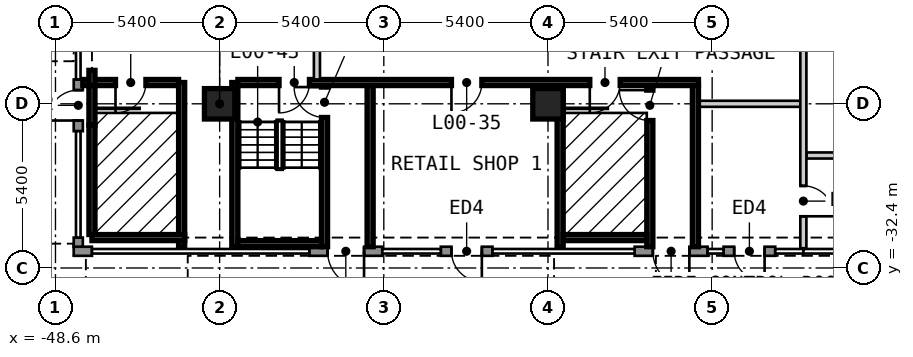
"""IFC4 building model, lengths in metres.
Left out: names, types, materials, properties, quantities, classifications, styles, units other than length and angle.
Written with IfcOpenShell. Run it as: python <this file> out.ifc"""

import sys

from ifc_helpers import new_model, si_unit, direction, frame, frame_2d, origin, origin_2d, place, context, subcontext, project, spatial, rectangle, extrude, element, fill, save


model = new_model("IFC4")
c1 = context("Model", 3, precision=1e-05, world=origin(), true_north=direction((0.0, 1.0)))
c2 = subcontext(c1, "Body", "Model", "MODEL_VIEW")
j1 = project(units=[si_unit("LENGTHUNIT", "METRE"), si_unit("PLANEANGLEUNIT", "RADIAN")], contexts=[c1])
p1 = place(None, origin())
s1 = spatial("IfcSite", under=j1, at=p1, CompositionType="ELEMENT")
p2 = place(p1, origin())
s2 = spatial("IfcBuilding", under=s1, at=p2, CompositionType="ELEMENT")
p3 = place(p2, origin())
s3 = spatial("IfcBuildingStorey", under=s2, at=p3, CompositionType="ELEMENT", Elevation=0.0)
for number, where, z_axis, x_axis in (
    (1, (-43.2, -27.0, 0.0), (0.0, 0.0, 1.0), (1.0, 0.0, 0.0)),
    (2, (-32.4, -27.0, 0.0), (0.0, 0.0, 1.0), (1.0, 0.0, 0.0)),
):
    element("IfcColumn", number, at=place(p3, frame(where, z_axis=z_axis, x_axis=x_axis)), inside=s3, PredefinedType="COLUMN", context=c2, shape_type="SweptSolid", body=[
        extrude(rectangle(XDim=1.0, YDim=1.0, at=origin_2d()), origin(), (0.0, 0.0, 1.0), 5.0),
    ])
p4 = place(p3, frame((-48.0, -31.85, 0.0), z_axis=(0.0, 0.0, 1.0), x_axis=(1.0, 0.0, 0.0)))
e3 = element("IfcWall", 3, at=p4, inside=s3, PredefinedType="SOLIDWALL", context=c2, shape_type="SweptSolid", body=[
    extrude(rectangle(XDim=0.6, YDim=0.3, at=frame_2d((0.3, 0.0))), origin(), (0.0, 0.0, 1.0), 4.55),
])
p5 = place(p3, frame((-40.25, -31.85, 0.0), z_axis=(0.0, 0.0, 1.0), x_axis=(1.0, 0.0, 0.0)))
e4 = element("IfcWall", 4, at=p5, inside=s3, PredefinedType="SOLIDWALL", context=c2, shape_type="SweptSolid", body=[
    extrude(rectangle(XDim=2.4, YDim=0.3, at=frame_2d((1.2, 0.0))), origin(), (0.0, 0.0, 1.0), 4.55),
])
p6 = place(p5, frame((1.8, 0.0, 0.0), z_axis=(0.0, 0.0, 1.0), x_axis=(-1.0, 0.0, 0.0)))
e5 = element("IfcOpeningElement", 5, at=p6, cuts=e4, PredefinedType="OPENING", context=c2, shape_type="SweptSolid", body=[
    extrude(rectangle(XDim=1.2, YDim=2.4, at=frame_2d((0.6, 1.2))), frame((0.0, 0.16, 0.0), z_axis=(0.0, -1.0, 0.0), x_axis=(1.0, 0.0, 0.0)), (0.0, 0.0, 1.0), 0.32),
])
p7 = place(p3, frame((-35.925, -31.85, 0.0), z_axis=(0.0, 0.0, 1.0), x_axis=(1.0, 0.0, 0.0)))
e6 = element("IfcWall", 6, at=p7, inside=s3, PredefinedType="SOLIDWALL", context=c2, shape_type="SweptSolid", body=[
    extrude(rectangle(XDim=1.7, YDim=0.3, at=frame_2d((0.85, 0.0))), origin(), (0.0, 0.0, 1.0), 4.55),
])
p8 = place(p7, frame((1.35, 0.0, 0.0), z_axis=(0.0, 0.0, 1.0), x_axis=(-1.0, 0.0, 0.0)))
e7 = element("IfcOpeningElement", 7, at=p8, cuts=e6, PredefinedType="OPENING", context=c2, shape_type="SweptSolid", body=[
    extrude(rectangle(XDim=1.0, YDim=2.4, at=frame_2d((0.5, 1.2))), frame((0.0, 0.16, 0.0), z_axis=(0.0, -1.0, 0.0), x_axis=(1.0, 0.0, 0.0)), (0.0, 0.0, 1.0), 0.32),
])
p9 = place(p3, frame((-29.55, -31.85, 0.0), z_axis=(0.0, 0.0, 1.0), x_axis=(1.0, 0.0, 0.0)))
e8 = element("IfcWall", 8, at=p9, inside=s3, PredefinedType="SOLIDWALL", context=c2, shape_type="SweptSolid", body=[
    extrude(rectangle(XDim=2.4, YDim=0.3, at=frame_2d((1.2, 0.0))), origin(), (0.0, 0.0, 1.0), 4.55),
])
p10 = place(p9, frame((1.8, 0.0, 0.0), z_axis=(0.0, 0.0, 1.0), x_axis=(-1.0, 0.0, 0.0)))
e9 = element("IfcOpeningElement", 9, at=p10, cuts=e8, PredefinedType="OPENING", context=c2, shape_type="SweptSolid", body=[
    extrude(rectangle(XDim=1.2, YDim=2.4, at=frame_2d((0.6, 1.2))), frame((0.0, 0.16, 0.0), z_axis=(0.0, -1.0, 0.0), x_axis=(1.0, 0.0, 0.0)), (0.0, 0.0, 1.0), 0.32),
])
p11 = place(p3, frame((-26.625, -31.85, 0.0), z_axis=(0.0, 0.0, 1.0), x_axis=(1.0, 0.0, 0.0)))
e10 = element("IfcWall", 10, at=p11, inside=s3, PredefinedType="SOLIDWALL", context=c2, shape_type="SweptSolid", body=[
    extrude(rectangle(XDim=1.7, YDim=0.3, at=frame_2d((0.85, 0.0))), origin(), (0.0, 0.0, 1.0), 4.55),
])
p12 = place(p11, frame((1.35, 0.0, 0.0), z_axis=(0.0, 0.0, 1.0), x_axis=(-1.0, 0.0, 0.0)))
e11 = element("IfcOpeningElement", 11, at=p12, cuts=e10, PredefinedType="OPENING", context=c2, shape_type="SweptSolid", body=[
    extrude(rectangle(XDim=1.0, YDim=2.4, at=frame_2d((0.5, 1.2))), frame((0.0, 0.16, 0.0), z_axis=(0.0, -1.0, 0.0), x_axis=(1.0, 0.0, 0.0)), (0.0, 0.0, 1.0), 0.32),
])
p13 = place(p3, frame((-47.85, -26.2, 0.0), z_axis=(0.0, 0.0, 1.0), x_axis=(0.0, -1.0, 0.0)))
e12 = element("IfcWall", 12, at=p13, inside=s3, PredefinedType="SOLIDWALL", context=c2, shape_type="SweptSolid", body=[
    extrude(rectangle(XDim=1.7, YDim=0.3, at=frame_2d((0.85, 0.0))), origin(), (0.0, 0.0, 1.0), 4.55),
])
p14 = place(p13, frame((1.35, 0.0, 0.0), z_axis=(0.0, 0.0, 1.0), x_axis=(-1.0, 0.0, 0.0)))
e13 = element("IfcOpeningElement", 13, at=p14, cuts=e12, PredefinedType="OPENING", context=c2, shape_type="SweptSolid", body=[
    extrude(rectangle(XDim=1.0, YDim=2.4, at=frame_2d((0.5, 1.2))), frame((0.0, 0.16, 0.0), z_axis=(0.0, -1.0, 0.0), x_axis=(1.0, 0.0, 0.0)), (0.0, 0.0, 1.0), 0.32),
])
p15 = place(p3, frame((-47.85, -31.4, 0.0), z_axis=(0.0, 0.0, 1.0), x_axis=(0.0, -1.0, 0.0)))
e14 = element("IfcWall", 14, at=p15, inside=s3, PredefinedType="SOLIDWALL", context=c2, shape_type="SweptSolid", body=[
    extrude(rectangle(XDim=0.3, YDim=0.3, at=frame_2d((0.15, 0.0))), origin(), (0.0, 0.0, 1.0), 4.55),
])
p16 = place(p3, frame((-23.9, -28.7, 0.0), z_axis=(0.0, 0.0, 1.0), x_axis=(1.0, 0.0, 0.0)))
e15 = element("IfcWall", 15, at=p16, inside=s3, PredefinedType="PARTITIONING", context=c2, shape_type="SweptSolid", body=[
    extrude(rectangle(XDim=9.4, YDim=0.2, at=frame_2d((4.7, 0.0))), origin(), (0.0, 0.0, 1.0), 4.55),
])
p17 = place(p16, frame((3.2, 0.0, 0.0)))
e16 = element("IfcOpeningElement", 16, at=p17, cuts=e15, PredefinedType="OPENING", context=c2, shape_type="SweptSolid", body=[
    extrude(rectangle(XDim=3.0, YDim=2.1, at=frame_2d((1.5, 1.05))), frame((0.0, 0.11, 0.0), z_axis=(0.0, -1.0, 0.0), x_axis=(1.0, 0.0, 0.0)), (0.0, 0.0, 1.0), 0.22),
])
p18 = place(p3, frame((-27.45, -27.0, 0.0), z_axis=(0.0, 0.0, 1.0), x_axis=(1.0, 0.0, 0.0)))
e17 = element("IfcWall", 17, at=p18, inside=s3, PredefinedType="SOLIDWALL", context=c2, shape_type="SweptSolid", body=[
    extrude(rectangle(XDim=3.35, YDim=0.2, at=frame_2d((1.675, 0.0))), origin(), (0.0, 0.0, 1.0), 4.55),
])
p19 = place(p3, frame((-47.7, -26.3, 0.0), z_axis=(0.0, 0.0, 1.0), x_axis=(1.0, 0.0, 0.0)))
e18 = element("IfcWall", 18, at=p19, inside=s3, PredefinedType="SOLIDWALL", context=c2, shape_type="SweptSolid", body=[
    extrude(rectangle(XDim=3.15, YDim=0.2, at=frame_2d((1.575, 0.0))), origin(), (0.0, 0.0, 1.0), 4.55),
])
p20 = place(p19, frame((2.075, 0.0, 0.0), z_axis=(0.0, 0.0, 1.0), x_axis=(-1.0, 0.0, 0.0)))
e19 = element("IfcOpeningElement", 19, at=p20, cuts=e18, PredefinedType="OPENING", context=c2, shape_type="SweptSolid", body=[
    extrude(rectangle(XDim=1.0, YDim=2.1, at=frame_2d((0.5, 1.05))), frame((0.0, 0.11, 0.0), z_axis=(0.0, -1.0, 0.0), x_axis=(1.0, 0.0, 0.0)), (0.0, 0.0, 1.0), 0.22),
])
p21 = place(p3, frame((-42.6, -26.3, 0.0), z_axis=(0.0, 0.0, 1.0), x_axis=(1.0, 0.0, 0.0)))
e20 = element("IfcWall", 20, at=p21, inside=s3, PredefinedType="SOLIDWALL", context=c2, shape_type="SweptSolid", body=[
    extrude(rectangle(XDim=15.15, YDim=0.2, at=frame_2d((7.575, 0.0))), origin(), (0.0, 0.0, 1.0), 4.55),
])
p22 = place(p21, frame((8.025, 0.0, 0.0), z_axis=(0.0, 0.0, 1.0), x_axis=(-1.0, 0.0, 0.0)))
e21 = element("IfcOpeningElement", 21, at=p22, cuts=e20, PredefinedType="OPENING", context=c2, shape_type="SweptSolid", body=[
    extrude(rectangle(XDim=1.0, YDim=2.1, at=frame_2d((0.5, 1.05))), frame((0.0, 0.11, 0.0), z_axis=(0.0, -1.0, 0.0), x_axis=(1.0, 0.0, 0.0)), (0.0, 0.0, 1.0), 0.22),
])
p23 = place(p21, frame((2.354, 0.0, 0.0), z_axis=(0.0, 0.0, 1.0), x_axis=(-1.0, 0.0, 0.0)))
e22 = element("IfcOpeningElement", 22, at=p23, cuts=e20, PredefinedType="OPENING", context=c2, shape_type="SweptSolid", body=[
    extrude(rectangle(XDim=1.0, YDim=2.1, at=frame_2d((0.5, 1.05))), frame((0.0, 0.11, 0.0), z_axis=(0.0, -1.0, 0.0), x_axis=(1.0, 0.0, 0.0)), (0.0, 0.0, 1.0), 0.22),
])
p24 = place(p21, frame((12.575, 0.0, 0.0), z_axis=(0.0, 0.0, 1.0), x_axis=(-1.0, 0.0, 0.0)))
e23 = element("IfcOpeningElement", 23, at=p24, cuts=e20, PredefinedType="OPENING", context=c2, shape_type="SweptSolid", body=[
    extrude(rectangle(XDim=1.0, YDim=2.1, at=frame_2d((0.5, 1.05))), frame((0.0, 0.11, 0.0), z_axis=(0.0, -1.0, 0.0), x_axis=(1.0, 0.0, 0.0)), (0.0, 0.0, 1.0), 0.22),
])
for number, where, z_axis, x_axis in (
    (24, (-44.45, -31.7, 0.0), (0.0, 0.0, 1.0), (0.0, 1.0, 0.0)),
    (25, (-42.7, -31.7, 0.0), (0.0, 0.0, 1.0), (0.0, 1.0, 0.0)),
):
    element("IfcWall", number, at=place(p3, frame(where, z_axis=z_axis, x_axis=x_axis)), inside=s3, PredefinedType="SOLIDWALL", context=c2, shape_type="SweptSolid", body=[
        extrude(rectangle(XDim=5.4, YDim=0.2, at=frame_2d((2.7, 0.0))), origin(), (0.0, 0.0, 1.0), 4.55),
    ])
p25 = place(p3, frame((-40.0, -26.2, 0.0), z_axis=(0.0, 0.0, 1.0), x_axis=(0.0, 1.0, 0.0)))
e26 = element("IfcWall", 26, at=p25, inside=s3, PredefinedType="PARTITIONING", context=c2, shape_type="SweptSolid", body=[
    extrude(rectangle(XDim=17.08, YDim=0.2, at=frame_2d((8.54, 0.0))), origin(), (0.0, 0.0, 1.0), 4.55),
])
p26 = place(p25, frame((3.552, 0.0, 0.0)))
e27 = element("IfcOpeningElement", 27, at=p26, cuts=e26, PredefinedType="OPENING", context=c2, shape_type="SweptSolid", body=[
    extrude(rectangle(XDim=1.0, YDim=2.1, at=frame_2d((0.5, 1.05))), frame((0.0, 0.11, 0.0), z_axis=(0.0, -1.0, 0.0), x_axis=(1.0, 0.0, 0.0)), (0.0, 0.0, 1.0), 0.22),
])
p27 = place(p25, frame((12.198, 0.0, 0.0)))
e28 = element("IfcOpeningElement", 28, at=p27, cuts=e26, PredefinedType="OPENING", context=c2, shape_type="SweptSolid", body=[
    extrude(rectangle(XDim=1.0, YDim=2.1, at=frame_2d((0.5, 1.05))), frame((0.0, 0.11, 0.0), z_axis=(0.0, -1.0, 0.0), x_axis=(1.0, 0.0, 0.0)), (0.0, 0.0, 1.0), 0.22),
])
p28 = place(p3, frame((-39.75, -31.7, 0.0), z_axis=(0.0, 0.0, 1.0), x_axis=(0.0, 1.0, 0.0)))
e29 = element("IfcWall", 29, at=p28, inside=s3, PredefinedType="SOLIDWALL", context=c2, shape_type="SweptSolid", body=[
    extrude(rectangle(XDim=5.3, YDim=0.2, at=frame_2d((2.65, 0.0))), origin(), (0.0, 0.0, 1.0), 4.55),
])
p29 = place(p28, frame((5.25, 0.0, 0.0), z_axis=(0.0, 0.0, 1.0), x_axis=(-1.0, 0.0, 0.0)))
e30 = element("IfcOpeningElement", 30, at=p29, cuts=e29, PredefinedType="OPENING", context=c2, shape_type="SweptSolid", body=[
    extrude(rectangle(XDim=1.0, YDim=2.1, at=frame_2d((0.5, 1.05))), frame((0.0, 0.11, 0.0), z_axis=(0.0, -1.0, 0.0), x_axis=(1.0, 0.0, 0.0)), (0.0, 0.0, 1.0), 0.22),
])
for number, where, z_axis, x_axis in (
    (31, (-38.25, -31.7, 0.0), (0.0, 0.0, 1.0), (0.0, 1.0, 0.0)),
    (32, (-32.0, -31.7, 0.0), (0.0, 0.0, 1.0), (0.0, 1.0, 0.0)),
):
    element("IfcWall", number, at=place(p3, frame(where, z_axis=z_axis, x_axis=x_axis)), inside=s3, PredefinedType="SOLIDWALL", context=c2, shape_type="SweptSolid", body=[
        extrude(rectangle(XDim=5.3, YDim=0.2, at=frame_2d((2.65, 0.0))), origin(), (0.0, 0.0, 1.0), 4.55),
    ])
p30 = place(p3, frame((-29.05, -31.7, 0.0), z_axis=(0.0, 0.0, 1.0), x_axis=(0.0, 1.0, 0.0)))
e33 = element("IfcWall", 33, at=p30, inside=s3, PredefinedType="SOLIDWALL", context=c2, shape_type="SweptSolid", body=[
    extrude(rectangle(XDim=5.3, YDim=0.2, at=frame_2d((2.65, 0.0))), origin(), (0.0, 0.0, 1.0), 4.55),
])
p31 = place(p30, frame((5.15, 0.0, 0.0), z_axis=(0.0, 0.0, 1.0), x_axis=(-1.0, 0.0, 0.0)))
e34 = element("IfcOpeningElement", 34, at=p31, cuts=e33, PredefinedType="OPENING", context=c2, shape_type="SweptSolid", body=[
    extrude(rectangle(XDim=1.0, YDim=2.1, at=frame_2d((0.5, 1.05))), frame((0.0, 0.11, 0.0), z_axis=(0.0, -1.0, 0.0), x_axis=(1.0, 0.0, 0.0)), (0.0, 0.0, 1.0), 0.22),
])
p32 = place(p3, frame((-27.55, -31.7, 0.0), z_axis=(0.0, 0.0, 1.0), x_axis=(0.0, 1.0, 0.0)))
e35 = element("IfcWall", 35, at=p32, inside=s3, PredefinedType="SOLIDWALL", context=c2, shape_type="SweptSolid", body=[
    extrude(rectangle(XDim=5.3, YDim=0.2, at=frame_2d((2.65, 0.0))), origin(), (0.0, 0.0, 1.0), 4.55),
])
p33 = place(p3, frame((-24.0, -31.75, 0.0), z_axis=(0.0, 0.0, 1.0), x_axis=(0.0, 1.0, 0.0)))
e36 = element("IfcWall", 36, at=p33, inside=s3, PredefinedType="SOLIDWALL", context=c2, shape_type="SweptSolid", body=[
    extrude(rectangle(XDim=18.346, YDim=0.2, at=frame_2d((9.173, 0.0))), origin(), (0.0, 0.0, 1.0), 4.55),
])
p34 = place(p33, frame((2.05, 0.0, 0.0), z_axis=(0.0, 0.0, 1.0), x_axis=(-1.0, 0.0, 0.0)))
e37 = element("IfcOpeningElement", 37, at=p34, cuts=e36, PredefinedType="OPENING", context=c2, shape_type="SweptSolid", body=[
    extrude(rectangle(XDim=1.0, YDim=2.1, at=frame_2d((0.5, 1.05))), frame((0.0, 0.11, 0.0), z_axis=(0.0, -1.0, 0.0), x_axis=(1.0, 0.0, 0.0)), (0.0, 0.0, 1.0), 0.22),
])
p35 = place(p33, frame((8.35, 0.0, 0.0)))
e38 = element("IfcOpeningElement", 38, at=p35, cuts=e36, PredefinedType="OPENING", context=c2, shape_type="SweptSolid", body=[
    extrude(rectangle(XDim=1.8, YDim=2.1, at=frame_2d((0.9, 1.05))), frame((0.0, 0.11, 0.0), z_axis=(0.0, -1.0, 0.0), x_axis=(1.0, 0.0, 0.0)), (0.0, 0.0, 1.0), 0.22),
])
p36 = place(p3, frame((-47.4, -31.3, 0.0), z_axis=(0.0, 0.0, 1.0), x_axis=(0.0, 1.0, 0.0)))
e39 = element("IfcWall", 39, at=p36, inside=s3, PredefinedType="SOLIDWALL", context=c2, shape_type="SweptSolid", body=[
    extrude(rectangle(XDim=3.6, YDim=0.2, at=frame_2d((1.8, 0.0))), origin(), (0.0, 0.0, 1.0), 4.55),
])
p37 = place(p3, frame((-47.4, -26.4, 0.0), z_axis=(0.0, 0.0, 1.0), x_axis=(0.0, 1.0, 0.0)))
e40 = element("IfcWall", 40, at=p37, inside=s3, PredefinedType="SOLIDWALL", context=c2, shape_type="SweptSolid", body=[
    extrude(rectangle(XDim=0.5, YDim=0.2, at=frame_2d((0.25, 0.0))), origin(), (0.0, 0.0, 1.0), 4.55),
])
p38 = place(p3, frame((-47.4, -27.7, 2.3), z_axis=(0.0, 0.0, 1.0), x_axis=(0.0, 1.0, 0.0)))
e41 = element("IfcWall", 41, at=p38, inside=s3, PredefinedType="SOLIDWALL", context=c2, shape_type="SweptSolid", body=[
    extrude(rectangle(XDim=1.3, YDim=0.2, at=frame_2d((0.65, 0.0))), origin(), (0.0, 0.0, 1.0), 2.25),
])
p39 = place(p3, frame((-47.4, -31.4, 0.0), z_axis=(0.0, 0.0, 1.0), x_axis=(1.0, 0.0, 0.0)))
e42 = element("IfcWall", 42, at=p39, inside=s3, PredefinedType="SOLIDWALL", context=c2, shape_type="SweptSolid", body=[
    extrude(rectangle(XDim=3.05, YDim=0.2, at=frame_2d((1.525, 0.0))), origin(), (0.0, 0.0, 1.0), 4.55),
])
for number, where, z_axis, x_axis in (
    (43, (-31.9, -31.4, 0.0), (0.0, 0.0, 1.0), (1.0, 0.0, 0.0)),
    (44, (-42.6, -31.6, 0.0), (0.0, 0.0, 1.0), (1.0, 0.0, 0.0)),
):
    element("IfcWall", number, at=place(p3, frame(where, z_axis=z_axis, x_axis=x_axis)), inside=s3, PredefinedType="SOLIDWALL", context=c2, shape_type="SweptSolid", body=[
        extrude(rectangle(XDim=2.75, YDim=0.2, at=frame_2d((1.375, 0.0))), origin(), (0.0, 0.0, 1.0), 4.55),
    ])
p40 = place(p6, origin())
e45 = element("IfcDoor", 45, at=p40, inside=s3, OperationType="SINGLE_SWING_RIGHT", PredefinedType="DOOR", context=c2, shape_type="SweptSolid", body=[
    extrude(rectangle(XDim=1.2, YDim=2.4, at=frame_2d((0.6, 1.2))), frame((0.0, 0.025, 0.0), z_axis=(0.0, -1.0, 0.0), x_axis=(1.0, 0.0, 0.0)), (0.0, 0.0, 1.0), 0.05),
])
fill(e5, e45)
p41 = place(p8, origin())
e46 = element("IfcDoor", 46, at=p41, inside=s3, OperationType="SINGLE_SWING_RIGHT", PredefinedType="DOOR", context=c2, shape_type="SweptSolid", body=[
    extrude(rectangle(XDim=1.0, YDim=2.4, at=frame_2d((0.5, 1.2))), frame((0.0, 0.025, 0.0), z_axis=(0.0, -1.0, 0.0), x_axis=(1.0, 0.0, 0.0)), (0.0, 0.0, 1.0), 0.05),
])
fill(e7, e46)
p42 = place(p10, origin())
e47 = element("IfcDoor", 47, at=p42, inside=s3, OperationType="SINGLE_SWING_RIGHT", PredefinedType="DOOR", context=c2, shape_type="SweptSolid", body=[
    extrude(rectangle(XDim=1.2, YDim=2.4, at=frame_2d((0.6, 1.2))), frame((0.0, 0.025, 0.0), z_axis=(0.0, -1.0, 0.0), x_axis=(1.0, 0.0, 0.0)), (0.0, 0.0, 1.0), 0.05),
])
fill(e9, e47)
p43 = place(p12, origin())
e48 = element("IfcDoor", 48, at=p43, inside=s3, OperationType="SINGLE_SWING_RIGHT", PredefinedType="DOOR", context=c2, shape_type="SweptSolid", body=[
    extrude(rectangle(XDim=1.0, YDim=2.4, at=frame_2d((0.5, 1.2))), frame((0.0, 0.025, 0.0), z_axis=(0.0, -1.0, 0.0), x_axis=(1.0, 0.0, 0.0)), (0.0, 0.0, 1.0), 0.05),
])
fill(e11, e48)
p44 = place(p14, origin())
e49 = element("IfcDoor", 49, at=p44, inside=s3, OperationType="SINGLE_SWING_RIGHT", PredefinedType="DOOR", context=c2, shape_type="SweptSolid", body=[
    extrude(rectangle(XDim=1.0, YDim=2.4, at=frame_2d((0.5, 1.2))), frame((0.0, 0.025, 0.0), z_axis=(0.0, -1.0, 0.0), x_axis=(1.0, 0.0, 0.0)), (0.0, 0.0, 1.0), 0.05),
])
fill(e13, e49)
p45 = place(p34, origin())
e50 = element("IfcDoor", 50, at=p45, inside=s3, OperationType="SINGLE_SWING_RIGHT", PredefinedType="DOOR", context=c2, shape_type="SweptSolid", body=[
    extrude(rectangle(XDim=1.0, YDim=2.1, at=frame_2d((0.5, 1.05))), frame((0.0, 0.025, 0.0), z_axis=(0.0, -1.0, 0.0), x_axis=(1.0, 0.0, 0.0)), (0.0, 0.0, 1.0), 0.05),
])
fill(e37, e50)
p46 = place(p22, origin())
e51 = element("IfcDoor", 51, at=p46, inside=s3, OperationType="SINGLE_SWING_RIGHT", PredefinedType="DOOR", context=c2, shape_type="SweptSolid", body=[
    extrude(rectangle(XDim=1.0, YDim=2.1, at=frame_2d((0.5, 1.05))), frame((0.0, 0.025, 0.0), z_axis=(0.0, -1.0, 0.0), x_axis=(1.0, 0.0, 0.0)), (0.0, 0.0, 1.0), 0.05),
])
fill(e21, e51)
p47 = place(p23, origin())
e52 = element("IfcDoor", 52, at=p47, inside=s3, OperationType="SINGLE_SWING_RIGHT", PredefinedType="DOOR", context=c2, shape_type="SweptSolid", body=[
    extrude(rectangle(XDim=1.0, YDim=2.1, at=frame_2d((0.5, 1.05))), frame((0.0, 0.025, 0.0), z_axis=(0.0, -1.0, 0.0), x_axis=(1.0, 0.0, 0.0)), (0.0, 0.0, 1.0), 0.05),
])
fill(e22, e52)
p48 = place(p24, origin())
e53 = element("IfcDoor", 53, at=p48, inside=s3, OperationType="SINGLE_SWING_RIGHT", PredefinedType="DOOR", context=c2, shape_type="SweptSolid", body=[
    extrude(rectangle(XDim=1.0, YDim=2.1, at=frame_2d((0.5, 1.05))), frame((0.0, 0.025, 0.0), z_axis=(0.0, -1.0, 0.0), x_axis=(1.0, 0.0, 0.0)), (0.0, 0.0, 1.0), 0.05),
])
fill(e23, e53)
p49 = place(p20, origin())
e54 = element("IfcDoor", 54, at=p49, inside=s3, OperationType="SINGLE_SWING_RIGHT", PredefinedType="DOOR", context=c2, shape_type="SweptSolid", body=[
    extrude(rectangle(XDim=1.0, YDim=2.1, at=frame_2d((0.5, 1.05))), frame((0.0, 0.025, 0.0), z_axis=(0.0, -1.0, 0.0), x_axis=(1.0, 0.0, 0.0)), (0.0, 0.0, 1.0), 0.05),
])
fill(e19, e54)
p50 = place(p31, origin())
e55 = element("IfcDoor", 55, at=p50, inside=s3, OperationType="SINGLE_SWING_LEFT", PredefinedType="DOOR", context=c2, shape_type="SweptSolid", body=[
    extrude(rectangle(XDim=1.0, YDim=2.1, at=frame_2d((0.5, 1.05))), frame((0.0, 0.025, 0.0), z_axis=(0.0, -1.0, 0.0), x_axis=(1.0, 0.0, 0.0)), (0.0, 0.0, 1.0), 0.05),
])
fill(e34, e55)
p51 = place(p29, origin())
e56 = element("IfcDoor", 56, at=p51, inside=s3, OperationType="SINGLE_SWING_LEFT", PredefinedType="DOOR", context=c2, shape_type="SweptSolid", body=[
    extrude(rectangle(XDim=1.0, YDim=2.1, at=frame_2d((0.5, 1.05))), frame((0.0, 0.025, 0.0), z_axis=(0.0, -1.0, 0.0), x_axis=(1.0, 0.0, 0.0)), (0.0, 0.0, 1.0), 0.05),
])
fill(e30, e56)
save(model, sys.argv[1])
